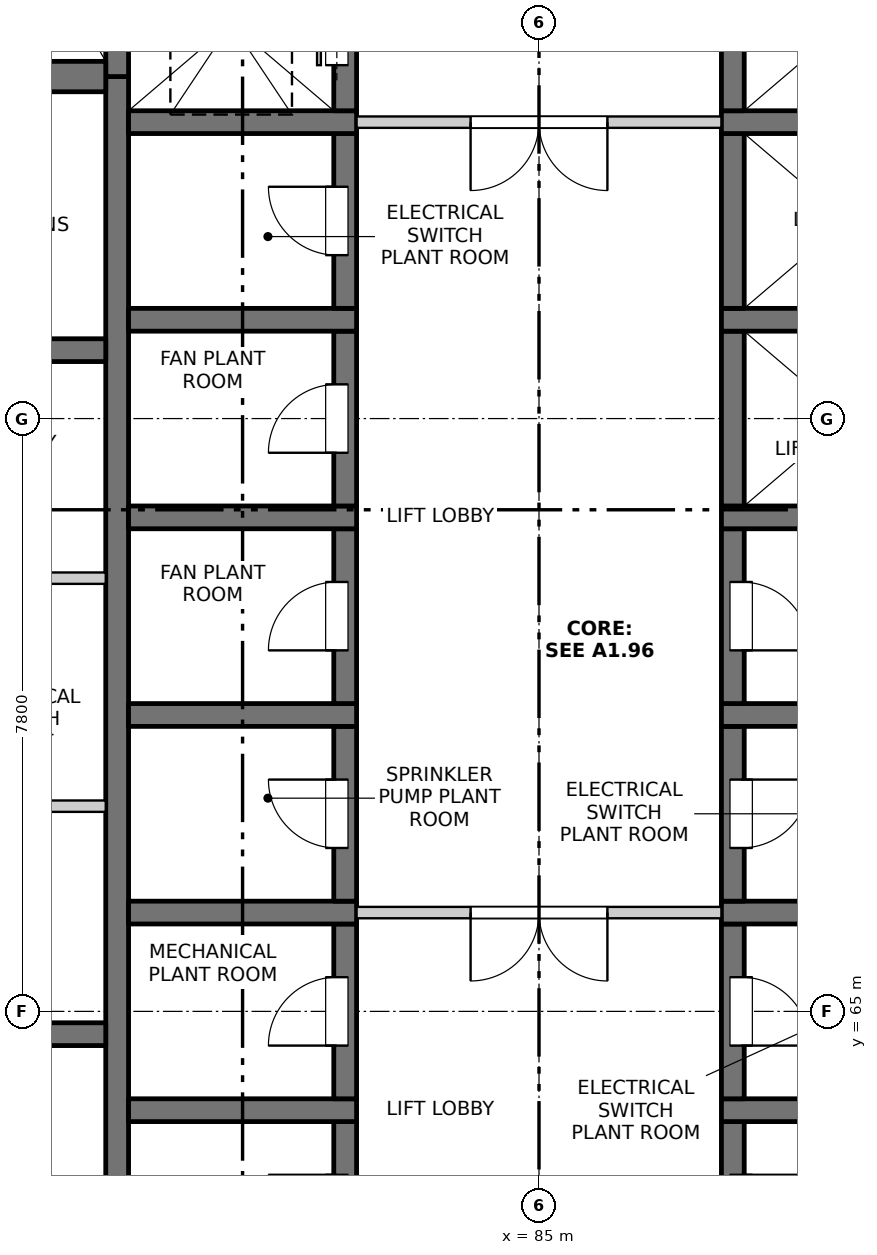
"""IFC4 building model, lengths in metres.
Left out: names, types, materials, properties, quantities, classifications, styles, units other than length and angle.
Written with IfcOpenShell. Run it as: python <this file> out.ifc"""

import sys

from ifc_helpers import new_model, si_unit, direction, frame, frame_2d, origin, place, context, subcontext, project, spatial, rectangle, extrude, element, fill, save


model = new_model("IFC4")
c1 = context("Model", 3, precision=1e-05, world=origin(), true_north=direction((0.0, 1.0)))
c2 = subcontext(c1, "Body", "Model", "MODEL_VIEW")
j1 = project(units=[si_unit("LENGTHUNIT", "METRE"), si_unit("PLANEANGLEUNIT", "RADIAN")], contexts=[c1])
p1 = place(None, origin())
s1 = spatial("IfcSite", under=j1, at=p1, CompositionType="ELEMENT")
p2 = place(p1, origin())
s2 = spatial("IfcBuilding", under=s1, at=p2, CompositionType="ELEMENT")
p3 = place(p2, frame((0.0, 0.0, 172.4)))
s3 = spatial("IfcBuildingStorey", under=s2, at=p3, CompositionType="ELEMENT", Elevation=172.4)
p4 = place(p3, frame((79.45, 60.95, -0.3), z_axis=(0.0, 0.0, 1.0), x_axis=(0.0, 1.0, 0.0)))
e1 = element("IfcWall", 1, at=p4, inside=s3, PredefinedType="SOLIDWALL", context=c2, shape_type="SweptSolid", body=[
    extrude(rectangle(XDim=16.35, YDim=0.3, at=frame_2d((8.175, 0.0))), origin(), (0.0, 0.0, 1.0), 6.8),
])
p5 = place(p3, frame((79.45, 77.3, -0.3), z_axis=(0.0, 0.0, 1.0), x_axis=(0.0, 1.0, 0.0)))
e2 = element("IfcWall", 2, at=p5, inside=s3, PredefinedType="SOLIDWALL", context=c2, shape_type="SweptSolid", body=[
    extrude(rectangle(XDim=6.925, YDim=0.3, at=frame_2d((3.462, 0.0))), origin(), (0.0, 0.0, 1.0), 6.8),
])
p6 = place(p3, frame((82.45, 61.25, -0.3), z_axis=(0.0, 0.0, 1.0), x_axis=(0.0, 1.0, 0.0)))
e3 = element("IfcWall", 3, at=p6, inside=s3, PredefinedType="SOLIDWALL", context=c2, shape_type="SweptSolid", body=[
    extrude(rectangle(XDim=2.3, YDim=0.3, at=frame_2d((1.15, 0.0))), origin(), (0.0, 0.0, 1.0), 6.8),
])
p7 = place(p6, frame((0.7, 0.0, 0.3)))
e4 = element("IfcOpeningElement", 4, at=p7, cuts=e3, PredefinedType="OPENING", context=c2, shape_type="SweptSolid", body=[
    extrude(rectangle(XDim=0.9, YDim=2.1, at=frame_2d((0.45, 1.05))), frame((0.0, 0.16, 0.0), z_axis=(0.0, -1.0, 0.0), x_axis=(1.0, 0.0, 0.0)), (0.0, 0.0, 1.0), 0.32),
])
p8 = place(p3, frame((79.6, 63.7, -0.3), z_axis=(0.0, 0.0, 1.0), x_axis=(1.0, 0.0, 0.0)))
e5 = element("IfcWall", 5, at=p8, inside=s3, PredefinedType="SOLIDWALL", context=c2, shape_type="SweptSolid", body=[
    extrude(rectangle(XDim=3.0, YDim=0.3, at=frame_2d((1.5, 0.0))), origin(), (0.0, 0.0, 1.0), 6.8),
])
p9 = place(p3, frame((82.45, 63.85, -0.3), z_axis=(0.0, 0.0, 1.0), x_axis=(0.0, 1.0, 0.0)))
e6 = element("IfcWall", 6, at=p9, inside=s3, PredefinedType="SOLIDWALL", context=c2, shape_type="SweptSolid", body=[
    extrude(rectangle(XDim=2.3, YDim=0.3, at=frame_2d((1.15, 0.0))), origin(), (0.0, 0.0, 1.0), 6.8),
])
p10 = place(p9, frame((0.7, 0.0, 0.3)))
e7 = element("IfcOpeningElement", 7, at=p10, cuts=e6, PredefinedType="OPENING", context=c2, shape_type="SweptSolid", body=[
    extrude(rectangle(XDim=0.9, YDim=2.1, at=frame_2d((0.45, 1.05))), frame((0.0, 0.16, 0.0), z_axis=(0.0, -1.0, 0.0), x_axis=(1.0, 0.0, 0.0)), (0.0, 0.0, 1.0), 0.32),
])
p11 = place(p3, frame((79.6, 66.3, -0.3), z_axis=(0.0, 0.0, 1.0), x_axis=(1.0, 0.0, 0.0)))
e8 = element("IfcWall", 8, at=p11, inside=s3, PredefinedType="SOLIDWALL", context=c2, shape_type="SweptSolid", body=[
    extrude(rectangle(XDim=3.0, YDim=0.3, at=frame_2d((1.5, 0.0))), origin(), (0.0, 0.0, 1.0), 6.8),
])
p12 = place(p3, frame((82.45, 66.45, -0.3), z_axis=(0.0, 0.0, 1.0), x_axis=(0.0, 1.0, 0.0)))
e9 = element("IfcWall", 9, at=p12, inside=s3, PredefinedType="SOLIDWALL", context=c2, shape_type="SweptSolid", body=[
    extrude(rectangle(XDim=2.3, YDim=0.3, at=frame_2d((1.15, 0.0))), origin(), (0.0, 0.0, 1.0), 6.8),
])
p13 = place(p12, frame((0.7, 0.0, 0.3)))
e10 = element("IfcOpeningElement", 10, at=p13, cuts=e9, PredefinedType="OPENING", context=c2, shape_type="SweptSolid", body=[
    extrude(rectangle(XDim=0.9, YDim=2.1, at=frame_2d((0.45, 1.05))), frame((0.0, 0.16, 0.0), z_axis=(0.0, -1.0, 0.0), x_axis=(1.0, 0.0, 0.0)), (0.0, 0.0, 1.0), 0.32),
])
p14 = place(p3, frame((79.6, 68.9, -0.3), z_axis=(0.0, 0.0, 1.0), x_axis=(1.0, 0.0, 0.0)))
e11 = element("IfcWall", 11, at=p14, inside=s3, PredefinedType="SOLIDWALL", context=c2, shape_type="SweptSolid", body=[
    extrude(rectangle(XDim=3.0, YDim=0.3, at=frame_2d((1.5, 0.0))), origin(), (0.0, 0.0, 1.0), 6.8),
])
p15 = place(p3, frame((82.45, 69.05, -0.3), z_axis=(0.0, 0.0, 1.0), x_axis=(0.0, 1.0, 0.0)))
e12 = element("IfcWall", 12, at=p15, inside=s3, PredefinedType="SOLIDWALL", context=c2, shape_type="SweptSolid", body=[
    extrude(rectangle(XDim=2.3, YDim=0.3, at=frame_2d((1.15, 0.0))), origin(), (0.0, 0.0, 1.0), 6.8),
])
p16 = place(p15, frame((0.7, 0.0, 0.3)))
e13 = element("IfcOpeningElement", 13, at=p16, cuts=e12, PredefinedType="OPENING", context=c2, shape_type="SweptSolid", body=[
    extrude(rectangle(XDim=0.9, YDim=2.1, at=frame_2d((0.45, 1.05))), frame((0.0, 0.16, 0.0), z_axis=(0.0, -1.0, 0.0), x_axis=(1.0, 0.0, 0.0)), (0.0, 0.0, 1.0), 0.32),
])
p17 = place(p3, frame((79.6, 71.5, -0.3), z_axis=(0.0, 0.0, 1.0), x_axis=(1.0, 0.0, 0.0)))
e14 = element("IfcWall", 14, at=p17, inside=s3, PredefinedType="SOLIDWALL", context=c2, shape_type="SweptSolid", body=[
    extrude(rectangle(XDim=3.0, YDim=0.3, at=frame_2d((1.5, 0.0))), origin(), (0.0, 0.0, 1.0), 6.8),
])
p18 = place(p3, frame((82.45, 71.65, -0.3), z_axis=(0.0, 0.0, 1.0), x_axis=(0.0, 1.0, 0.0)))
e15 = element("IfcWall", 15, at=p18, inside=s3, PredefinedType="SOLIDWALL", context=c2, shape_type="SweptSolid", body=[
    extrude(rectangle(XDim=2.3, YDim=0.3, at=frame_2d((1.15, 0.0))), origin(), (0.0, 0.0, 1.0), 6.8),
])
p19 = place(p18, frame((0.7, 0.0, 0.3)))
e16 = element("IfcOpeningElement", 16, at=p19, cuts=e15, PredefinedType="OPENING", context=c2, shape_type="SweptSolid", body=[
    extrude(rectangle(XDim=0.9, YDim=2.1, at=frame_2d((0.45, 1.05))), frame((0.0, 0.16, 0.0), z_axis=(0.0, -1.0, 0.0), x_axis=(1.0, 0.0, 0.0)), (0.0, 0.0, 1.0), 0.32),
])
p20 = place(p3, frame((79.6, 74.1, -0.3), z_axis=(0.0, 0.0, 1.0), x_axis=(1.0, 0.0, 0.0)))
e17 = element("IfcWall", 17, at=p20, inside=s3, PredefinedType="SOLIDWALL", context=c2, shape_type="SweptSolid", body=[
    extrude(rectangle(XDim=3.0, YDim=0.3, at=frame_2d((1.5, 0.0))), origin(), (0.0, 0.0, 1.0), 6.8),
])
p21 = place(p3, frame((82.45, 74.25, -0.3), z_axis=(0.0, 0.0, 1.0), x_axis=(0.0, 1.0, 0.0)))
e18 = element("IfcWall", 18, at=p21, inside=s3, PredefinedType="SOLIDWALL", context=c2, shape_type="SweptSolid", body=[
    extrude(rectangle(XDim=2.3, YDim=0.3, at=frame_2d((1.15, 0.0))), origin(), (0.0, 0.0, 1.0), 6.8),
])
p22 = place(p21, frame((0.7, 0.0, 0.3)))
e19 = element("IfcOpeningElement", 19, at=p22, cuts=e18, PredefinedType="OPENING", context=c2, shape_type="SweptSolid", body=[
    extrude(rectangle(XDim=0.9, YDim=2.1, at=frame_2d((0.45, 1.05))), frame((0.0, 0.16, 0.0), z_axis=(0.0, -1.0, 0.0), x_axis=(1.0, 0.0, 0.0)), (0.0, 0.0, 1.0), 0.32),
])
p23 = place(p3, frame((79.6, 76.7, -0.3), z_axis=(0.0, 0.0, 1.0), x_axis=(1.0, 0.0, 0.0)))
e20 = element("IfcWall", 20, at=p23, inside=s3, PredefinedType="SOLIDWALL", context=c2, shape_type="SweptSolid", body=[
    extrude(rectangle(XDim=3.0, YDim=0.3, at=frame_2d((1.5, 0.0))), origin(), (0.0, 0.0, 1.0), 6.8),
])
p24 = place(p3, frame((82.45, 76.85, -0.3), z_axis=(0.0, 0.0, 1.0), x_axis=(0.0, 1.0, 0.0)))
e21 = element("IfcWall", 21, at=p24, inside=s3, PredefinedType="SOLIDWALL", context=c2, shape_type="SweptSolid", body=[
    extrude(rectangle(XDim=2.3, YDim=0.3, at=frame_2d((1.15, 0.0))), origin(), (0.0, 0.0, 1.0), 6.8),
])
p25 = place(p24, frame((0.6, 0.0, 0.3)))
e22 = element("IfcOpeningElement", 22, at=p25, cuts=e21, PredefinedType="OPENING", context=c2, shape_type="SweptSolid", body=[
    extrude(rectangle(XDim=1.1, YDim=2.1, at=frame_2d((0.55, 1.05))), frame((0.0, 0.16, 0.0), z_axis=(0.0, -1.0, 0.0), x_axis=(1.0, 0.0, 0.0)), (0.0, 0.0, 1.0), 0.32),
])
p26 = place(p3, frame((87.55, 61.25, -0.3), z_axis=(0.0, 0.0, 1.0), x_axis=(0.0, 1.0, 0.0)))
e23 = element("IfcWall", 23, at=p26, inside=s3, PredefinedType="SOLIDWALL", context=c2, shape_type="SweptSolid", body=[
    extrude(rectangle(XDim=2.3, YDim=0.3, at=frame_2d((1.15, 0.0))), origin(), (0.0, 0.0, 1.0), 6.8),
])
p27 = place(p26, frame((0.7, 0.0, 0.3)))
e24 = element("IfcOpeningElement", 24, at=p27, cuts=e23, PredefinedType="OPENING", context=c2, shape_type="SweptSolid", body=[
    extrude(rectangle(XDim=0.9, YDim=2.1, at=frame_2d((0.45, 1.05))), frame((0.0, 0.16, 0.0), z_axis=(0.0, -1.0, 0.0), x_axis=(1.0, 0.0, 0.0)), (0.0, 0.0, 1.0), 0.32),
])
p28 = place(p3, frame((87.4, 63.7, -0.3), z_axis=(0.0, 0.0, 1.0), x_axis=(1.0, 0.0, 0.0)))
e25 = element("IfcWall", 25, at=p28, inside=s3, PredefinedType="SOLIDWALL", context=c2, shape_type="SweptSolid", body=[
    extrude(rectangle(XDim=3.0, YDim=0.3, at=frame_2d((1.5, 0.0))), origin(), (0.0, 0.0, 1.0), 6.8),
])
p29 = place(p3, frame((87.55, 63.85, -0.3), z_axis=(0.0, 0.0, 1.0), x_axis=(0.0, 1.0, 0.0)))
e26 = element("IfcWall", 26, at=p29, inside=s3, PredefinedType="SOLIDWALL", context=c2, shape_type="SweptSolid", body=[
    extrude(rectangle(XDim=2.3, YDim=0.3, at=frame_2d((1.15, 0.0))), origin(), (0.0, 0.0, 1.0), 6.8),
])
p30 = place(p29, frame((0.7, 0.0, 0.3)))
e27 = element("IfcOpeningElement", 27, at=p30, cuts=e26, PredefinedType="OPENING", context=c2, shape_type="SweptSolid", body=[
    extrude(rectangle(XDim=0.9, YDim=2.1, at=frame_2d((0.45, 1.05))), frame((0.0, 0.16, 0.0), z_axis=(0.0, -1.0, 0.0), x_axis=(1.0, 0.0, 0.0)), (0.0, 0.0, 1.0), 0.32),
])
p31 = place(p3, frame((87.4, 66.3, -0.3), z_axis=(0.0, 0.0, 1.0), x_axis=(1.0, 0.0, 0.0)))
e28 = element("IfcWall", 28, at=p31, inside=s3, PredefinedType="SOLIDWALL", context=c2, shape_type="SweptSolid", body=[
    extrude(rectangle(XDim=3.0, YDim=0.3, at=frame_2d((1.5, 0.0))), origin(), (0.0, 0.0, 1.0), 6.8),
])
p32 = place(p3, frame((87.55, 66.45, -0.3), z_axis=(0.0, 0.0, 1.0), x_axis=(0.0, 1.0, 0.0)))
e29 = element("IfcWall", 29, at=p32, inside=s3, PredefinedType="SOLIDWALL", context=c2, shape_type="SweptSolid", body=[
    extrude(rectangle(XDim=2.3, YDim=0.3, at=frame_2d((1.15, 0.0))), origin(), (0.0, 0.0, 1.0), 6.8),
])
p33 = place(p32, frame((0.7, 0.0, 0.3)))
e30 = element("IfcOpeningElement", 30, at=p33, cuts=e29, PredefinedType="OPENING", context=c2, shape_type="SweptSolid", body=[
    extrude(rectangle(XDim=0.9, YDim=2.1, at=frame_2d((0.45, 1.05))), frame((0.0, 0.16, 0.0), z_axis=(0.0, -1.0, 0.0), x_axis=(1.0, 0.0, 0.0)), (0.0, 0.0, 1.0), 0.32),
])
p34 = place(p3, frame((87.4, 68.9, -0.3), z_axis=(0.0, 0.0, 1.0), x_axis=(1.0, 0.0, 0.0)))
e31 = element("IfcWall", 31, at=p34, inside=s3, PredefinedType="SOLIDWALL", context=c2, shape_type="SweptSolid", body=[
    extrude(rectangle(XDim=3.0, YDim=0.3, at=frame_2d((1.5, 0.0))), origin(), (0.0, 0.0, 1.0), 6.8),
])
p35 = place(p3, frame((87.55, 69.05, -0.3), z_axis=(0.0, 0.0, 1.0), x_axis=(0.0, 1.0, 0.0)))
e32 = element("IfcWall", 32, at=p35, inside=s3, PredefinedType="SOLIDWALL", context=c2, shape_type="SweptSolid", body=[
    extrude(rectangle(XDim=2.3, YDim=0.3, at=frame_2d((1.15, 0.0))), origin(), (0.0, 0.0, 1.0), 6.8),
])
p36 = place(p35, frame((0.7, 0.0, 0.3)))
e33 = element("IfcOpeningElement", 33, at=p36, cuts=e32, PredefinedType="OPENING", context=c2, shape_type="SweptSolid", body=[
    extrude(rectangle(XDim=0.9, YDim=2.1, at=frame_2d((0.45, 1.05))), frame((0.0, 0.16, 0.0), z_axis=(0.0, -1.0, 0.0), x_axis=(1.0, 0.0, 0.0)), (0.0, 0.0, 1.0), 0.32),
])
p37 = place(p3, frame((87.4, 71.5, -0.3), z_axis=(0.0, 0.0, 1.0), x_axis=(1.0, 0.0, 0.0)))
e34 = element("IfcWall", 34, at=p37, inside=s3, PredefinedType="SOLIDWALL", context=c2, shape_type="SweptSolid", body=[
    extrude(rectangle(XDim=3.0, YDim=0.3, at=frame_2d((1.5, 0.0))), origin(), (0.0, 0.0, 1.0), 6.8),
])
p38 = place(p3, frame((87.55, 71.65, -0.3), z_axis=(0.0, 0.0, 1.0), x_axis=(0.0, 1.0, 0.0)))
e35 = element("IfcWall", 35, at=p38, inside=s3, PredefinedType="SOLIDWALL", context=c2, shape_type="SweptSolid", body=[
    extrude(rectangle(XDim=2.3, YDim=0.3, at=frame_2d((1.15, 0.0))), origin(), (0.0, 0.0, 1.0), 6.8),
])
p39 = place(p3, frame((87.4, 74.1, -0.3), z_axis=(0.0, 0.0, 1.0), x_axis=(1.0, 0.0, 0.0)))
e36 = element("IfcWall", 36, at=p39, inside=s3, PredefinedType="SOLIDWALL", context=c2, shape_type="SweptSolid", body=[
    extrude(rectangle(XDim=3.0, YDim=0.3, at=frame_2d((1.5, 0.0))), origin(), (0.0, 0.0, 1.0), 6.8),
])
p40 = place(p3, frame((87.55, 74.25, -0.3), z_axis=(0.0, 0.0, 1.0), x_axis=(0.0, 1.0, 0.0)))
e37 = element("IfcWall", 37, at=p40, inside=s3, PredefinedType="SOLIDWALL", context=c2, shape_type="SweptSolid", body=[
    extrude(rectangle(XDim=2.3, YDim=0.3, at=frame_2d((1.15, 0.0))), origin(), (0.0, 0.0, 1.0), 6.8),
])
p41 = place(p3, frame((87.4, 76.7, -0.3), z_axis=(0.0, 0.0, 1.0), x_axis=(1.0, 0.0, 0.0)))
e38 = element("IfcWall", 38, at=p41, inside=s3, PredefinedType="SOLIDWALL", context=c2, shape_type="SweptSolid", body=[
    extrude(rectangle(XDim=3.0, YDim=0.3, at=frame_2d((1.5, 0.0))), origin(), (0.0, 0.0, 1.0), 6.8),
])
p42 = place(p3, frame((87.55, 76.85, -0.3), z_axis=(0.0, 0.0, 1.0), x_axis=(0.0, 1.0, 0.0)))
e39 = element("IfcWall", 39, at=p42, inside=s3, PredefinedType="SOLIDWALL", context=c2, shape_type="SweptSolid", body=[
    extrude(rectangle(XDim=2.3, YDim=0.3, at=frame_2d((1.15, 0.0))), origin(), (0.0, 0.0, 1.0), 6.8),
])
for number, where, z_axis, x_axis in (
    (40, (75.525, 64.7, -0.3), (0.0, 0.0, 1.0), (1.0, 0.0, 0.0)),
    (41, (75.525, 73.7, -0.3), (0.0, 0.0, 1.0), (1.0, 0.0, 0.0)),
):
    element("IfcWall", number, at=place(p3, frame(where, z_axis=z_axis, x_axis=x_axis)), inside=s3, PredefinedType="SOLIDWALL", context=c2, shape_type="SweptSolid", body=[
        extrude(rectangle(XDim=3.775, YDim=0.3, at=frame_2d((1.888, 0.0))), origin(), (0.0, 0.0, 1.0), 6.8),
    ])
p43 = place(p3, frame((75.525, 77.3, -0.3), z_axis=(0.0, 0.0, 1.0), x_axis=(1.0, 0.0, 0.0)))
e42 = element("IfcWall", 42, at=p43, inside=s3, PredefinedType="SOLIDWALL", context=c2, shape_type="SweptSolid", body=[
    extrude(rectangle(XDim=3.775, YDim=0.4, at=frame_2d((1.888, 0.0))), origin(), (0.0, 0.0, 1.0), 6.8),
])
p44 = place(p3, frame((82.6, 66.3, 0.0), z_axis=(0.0, 0.0, 1.0), x_axis=(1.0, 0.0, 0.0)))
e43 = element("IfcWall", 43, at=p44, inside=s3, PredefinedType="PARTITIONING", context=c2, shape_type="SweptSolid", body=[
    extrude(rectangle(XDim=4.8, YDim=0.15, at=frame_2d((2.4, 0.0))), origin(), (0.0, 0.0, 1.0), 6.5),
])
p45 = place(p44, frame((1.5, 0.0, 0.0)))
e44 = element("IfcOpeningElement", 44, at=p45, cuts=e43, PredefinedType="OPENING", context=c2, shape_type="SweptSolid", body=[
    extrude(rectangle(XDim=1.8, YDim=2.1, at=frame_2d((0.9, 1.05))), frame((0.0, 0.085, 0.0), z_axis=(0.0, -1.0, 0.0), x_axis=(1.0, 0.0, 0.0)), (0.0, 0.0, 1.0), 0.17),
])
for number, where, z_axis, x_axis in (
    (45, (75.525, 67.7, 0.0), (0.0, 0.0, 1.0), (1.0, 0.0, 0.0)),
    (46, (75.525, 70.7, 0.0), (0.0, 0.0, 1.0), (1.0, 0.0, 0.0)),
):
    element("IfcWall", number, at=place(p3, frame(where, z_axis=z_axis, x_axis=x_axis)), inside=s3, PredefinedType="PARTITIONING", context=c2, shape_type="SweptSolid", body=[
        extrude(rectangle(XDim=3.775, YDim=0.15, at=frame_2d((1.887, 0.0))), origin(), (0.0, 0.0, 1.0), 6.5),
    ])
p46 = place(p3, frame((82.6, 76.7, 0.0), z_axis=(0.0, 0.0, 1.0), x_axis=(1.0, 0.0, 0.0)))
e47 = element("IfcWall", 47, at=p46, inside=s3, PredefinedType="PARTITIONING", context=c2, shape_type="SweptSolid", body=[
    extrude(rectangle(XDim=4.8, YDim=0.15, at=frame_2d((2.4, 0.0))), origin(), (0.0, 0.0, 1.0), 6.5),
])
p47 = place(p46, frame((1.5, 0.0, 0.0)))
e48 = element("IfcOpeningElement", 48, at=p47, cuts=e47, PredefinedType="OPENING", context=c2, shape_type="SweptSolid", body=[
    extrude(rectangle(XDim=1.8, YDim=2.1, at=frame_2d((0.9, 1.05))), frame((0.0, 0.085, 0.0), z_axis=(0.0, -1.0, 0.0), x_axis=(1.0, 0.0, 0.0)), (0.0, 0.0, 1.0), 0.17),
])
p48 = place(p10, origin())
e49 = element("IfcDoor", 49, at=p48, inside=s3, OperationType="SINGLE_SWING_LEFT", PredefinedType="DOOR", context=c2, shape_type="SweptSolid", body=[
    extrude(rectangle(XDim=0.9, YDim=2.1, at=frame_2d((0.45, 1.05))), frame((0.0, 0.135, 0.0), z_axis=(0.0, -1.0, 0.0), x_axis=(1.0, 0.0, 0.0)), (0.0, 0.0, 1.0), 0.05),
])
fill(e7, e49)
p49 = place(p30, origin())
e50 = element("IfcDoor", 50, at=p49, inside=s3, OperationType="SINGLE_SWING_RIGHT", PredefinedType="DOOR", context=c2, shape_type="SweptSolid", body=[
    extrude(rectangle(XDim=0.9, YDim=2.1, at=frame_2d((0.45, 1.05))), frame((0.0, -0.085, 0.0), z_axis=(0.0, -1.0, 0.0), x_axis=(1.0, 0.0, 0.0)), (0.0, 0.0, 1.0), 0.05),
])
fill(e27, e50)
p50 = place(p45, origin())
e51 = element("IfcDoor", 51, at=p50, inside=s3, OperationType="DOUBLE_DOOR_SINGLE_SWING", PredefinedType="DOOR", context=c2, shape_type="SweptSolid", body=[
    extrude(rectangle(XDim=1.8, YDim=2.1, at=frame_2d((0.9, 1.05))), frame((0.0, 0.025, 0.0), z_axis=(0.0, -1.0, 0.0), x_axis=(1.0, 0.0, 0.0)), (0.0, 0.0, 1.0), 0.05),
])
fill(e44, e51)
p51 = place(p13, origin())
e52 = element("IfcDoor", 52, at=p51, inside=s3, OperationType="SINGLE_SWING_RIGHT", PredefinedType="DOOR", context=c2, shape_type="SweptSolid", body=[
    extrude(rectangle(XDim=0.9, YDim=2.1, at=frame_2d((0.45, 1.05))), frame((0.0, 0.135, 0.0), z_axis=(0.0, -1.0, 0.0), x_axis=(1.0, 0.0, 0.0)), (0.0, 0.0, 1.0), 0.05),
])
fill(e10, e52)
p52 = place(p33, origin())
e53 = element("IfcDoor", 53, at=p52, inside=s3, OperationType="SINGLE_SWING_LEFT", PredefinedType="DOOR", context=c2, shape_type="SweptSolid", body=[
    extrude(rectangle(XDim=0.9, YDim=2.1, at=frame_2d((0.45, 1.05))), frame((0.0, -0.085, 0.0), z_axis=(0.0, -1.0, 0.0), x_axis=(1.0, 0.0, 0.0)), (0.0, 0.0, 1.0), 0.05),
])
fill(e30, e53)
p53 = place(p16, origin())
e54 = element("IfcDoor", 54, at=p53, inside=s3, OperationType="SINGLE_SWING_LEFT", PredefinedType="DOOR", context=c2, shape_type="SweptSolid", body=[
    extrude(rectangle(XDim=0.9, YDim=2.1, at=frame_2d((0.45, 1.05))), frame((0.0, 0.135, 0.0), z_axis=(0.0, -1.0, 0.0), x_axis=(1.0, 0.0, 0.0)), (0.0, 0.0, 1.0), 0.05),
])
fill(e13, e54)
p54 = place(p36, origin())
e55 = element("IfcDoor", 55, at=p54, inside=s3, OperationType="SINGLE_SWING_RIGHT", PredefinedType="DOOR", context=c2, shape_type="SweptSolid", body=[
    extrude(rectangle(XDim=0.9, YDim=2.1, at=frame_2d((0.45, 1.05))), frame((0.0, -0.085, 0.0), z_axis=(0.0, -1.0, 0.0), x_axis=(1.0, 0.0, 0.0)), (0.0, 0.0, 1.0), 0.05),
])
fill(e33, e55)
p55 = place(p19, origin())
e56 = element("IfcDoor", 56, at=p55, inside=s3, OperationType="SINGLE_SWING_LEFT", PredefinedType="DOOR", context=c2, shape_type="SweptSolid", body=[
    extrude(rectangle(XDim=0.9, YDim=2.1, at=frame_2d((0.45, 1.05))), frame((0.0, 0.135, 0.0), z_axis=(0.0, -1.0, 0.0), x_axis=(1.0, 0.0, 0.0)), (0.0, 0.0, 1.0), 0.05),
])
fill(e16, e56)
p56 = place(p22, origin())
e57 = element("IfcDoor", 57, at=p56, inside=s3, OperationType="SINGLE_SWING_RIGHT", PredefinedType="DOOR", context=c2, shape_type="SweptSolid", body=[
    extrude(rectangle(XDim=0.9, YDim=2.1, at=frame_2d((0.45, 1.05))), frame((0.0, 0.135, 0.0), z_axis=(0.0, -1.0, 0.0), x_axis=(1.0, 0.0, 0.0)), (0.0, 0.0, 1.0), 0.05),
])
fill(e19, e57)
p57 = place(p47, origin())
e58 = element("IfcDoor", 58, at=p57, inside=s3, OperationType="DOUBLE_DOOR_SINGLE_SWING", PredefinedType="DOOR", context=c2, shape_type="SweptSolid", body=[
    extrude(rectangle(XDim=1.8, YDim=2.1, at=frame_2d((0.9, 1.05))), frame((0.0, 0.025, 0.0), z_axis=(0.0, -1.0, 0.0), x_axis=(1.0, 0.0, 0.0)), (0.0, 0.0, 1.0), 0.05),
])
fill(e48, e58)
p58 = place(p25, origin())
e59 = element("IfcDoor", 59, at=p58, inside=s3, OperationType="SLIDING_TO_LEFT", PredefinedType="DOOR", context=c2, shape_type="SweptSolid", body=[
    extrude(rectangle(XDim=1.1, YDim=2.1, at=frame_2d((0.55, 1.05))), frame((0.0, 0.135, 0.0), z_axis=(0.0, -1.0, 0.0), x_axis=(1.0, 0.0, 0.0)), (0.0, 0.0, 1.0), 0.05),
])
fill(e22, e59)
save(model, sys.argv[1])
